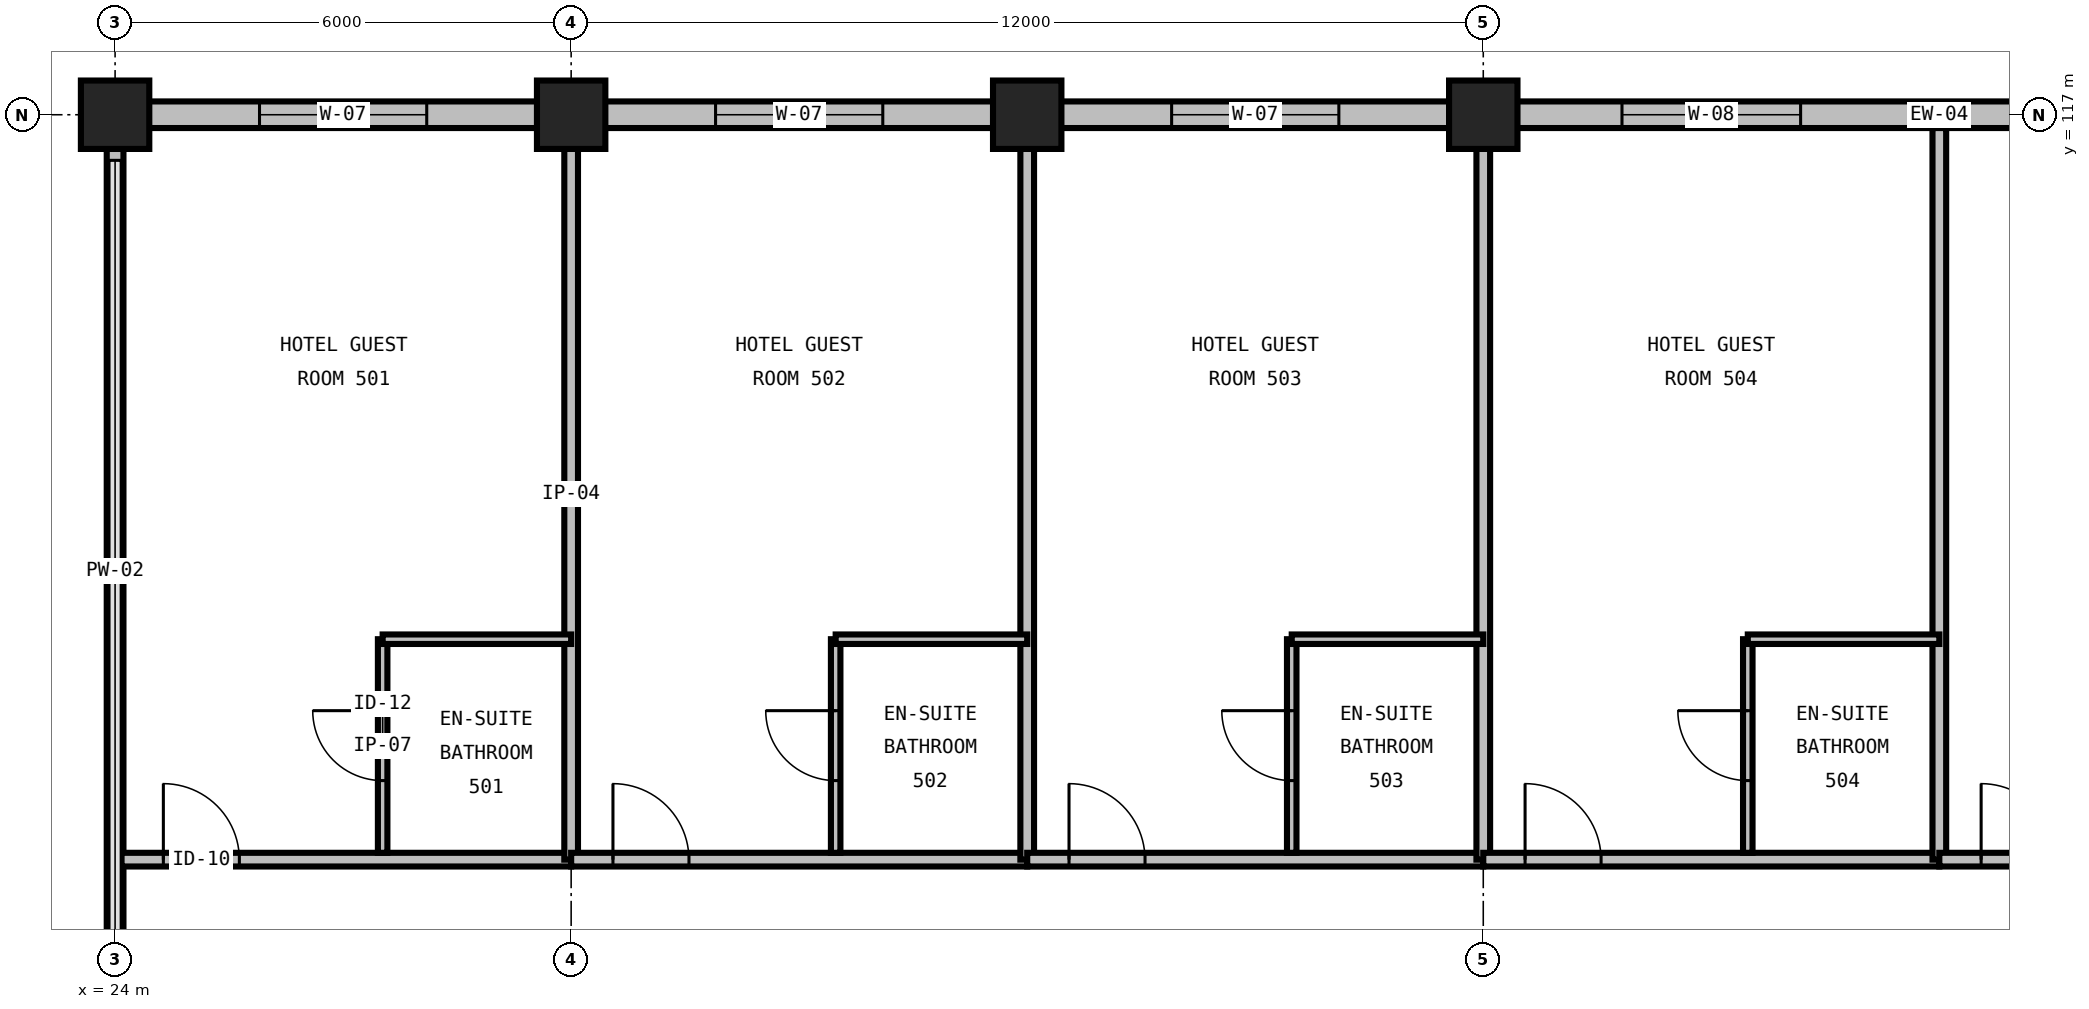
"""IFC4 building model, lengths in metres.
Left out: names, types, materials, properties, quantities, classifications, styles, units other than length and angle.
Written with IfcOpenShell. Run it as: python <this file> out.ifc"""

import sys

from ifc_helpers import new_model, si_unit, direction, frame, frame_2d, origin, origin_2d, place, context, subcontext, project, spatial, rectangle, extrude, element, fill, save


model = new_model("IFC4")
c1 = context("Model", 3, precision=1e-05, world=origin(), true_north=direction((0.0, 1.0)))
c2 = subcontext(c1, "Body", "Model", "MODEL_VIEW")
j1 = project(units=[si_unit("LENGTHUNIT", "METRE"), si_unit("PLANEANGLEUNIT", "RADIAN")], contexts=[c1])
p1 = place(None, origin())
s1 = spatial("IfcSite", under=j1, at=p1, CompositionType="ELEMENT")
p2 = place(p1, origin())
s2 = spatial("IfcBuilding", under=s1, at=p2, CompositionType="ELEMENT")
p3 = place(p2, frame((0.0, 0.0, 27.6)))
s3 = spatial("IfcBuildingStorey", under=s2, at=p3, CompositionType="ELEMENT", Elevation=27.6)
for number, where, z_axis, x_axis in (
    (1, (24.0, 117.0, 0.0), (0.0, 0.0, 1.0), (1.0, 0.0, 0.0)),
    (2, (30.0, 117.0, 0.0), (0.0, 0.0, 1.0), (1.0, 0.0, 0.0)),
    (3, (36.0, 117.0, 0.0), (0.0, 0.0, 1.0), (1.0, 0.0, 0.0)),
    (4, (42.0, 117.0, 0.0), (0.0, 0.0, 1.0), (1.0, 0.0, 0.0)),
):
    element("IfcColumn", number, at=place(p3, frame(where, z_axis=z_axis, x_axis=x_axis)), inside=s3, PredefinedType="COLUMN", context=c2, shape_type="SweptSolid", body=[
        extrude(rectangle(XDim=0.9, YDim=0.9, at=origin_2d()), origin(), (0.0, 0.0, 1.0), 3.6),
    ])
p4 = place(p3, frame((30.0, 117.0, 0.0), z_axis=(0.0, 0.0, 1.0), x_axis=(-1.0, 0.0, 0.0)))
e5 = element("IfcWall", 5, at=p4, inside=s3, PredefinedType="STANDARD", context=c2, shape_type="SweptSolid", body=[
    extrude(rectangle(XDim=6.0, YDim=0.35, at=frame_2d((3.0, 0.0))), origin(), (0.0, 0.0, 1.0), 2.486),
])
p5 = place(p4, frame((1.9, 0.0, 0.75)))
e6 = element("IfcOpeningElement", 6, at=p5, cuts=e5, PredefinedType="OPENING", context=c2, shape_type="SweptSolid", body=[
    extrude(rectangle(XDim=2.2, YDim=1.6, at=frame_2d((1.1, 0.8))), frame((0.0, 0.19, 0.0), z_axis=(0.0, -1.0, 0.0), x_axis=(1.0, 0.0, 0.0)), (0.0, 0.0, 1.0), 0.38),
])
p6 = place(p3, frame((36.0, 117.0, 0.0), z_axis=(0.0, 0.0, 1.0), x_axis=(-1.0, 0.0, 0.0)))
e7 = element("IfcWall", 7, at=p6, inside=s3, PredefinedType="STANDARD", context=c2, shape_type="SweptSolid", body=[
    extrude(rectangle(XDim=6.0, YDim=0.35, at=frame_2d((3.0, 0.0))), origin(), (0.0, 0.0, 1.0), 2.486),
])
p7 = place(p6, frame((1.9, 0.0, 0.75)))
e8 = element("IfcOpeningElement", 8, at=p7, cuts=e7, PredefinedType="OPENING", context=c2, shape_type="SweptSolid", body=[
    extrude(rectangle(XDim=2.2, YDim=1.6, at=frame_2d((1.1, 0.8))), frame((0.0, 0.19, 0.0), z_axis=(0.0, -1.0, 0.0), x_axis=(1.0, 0.0, 0.0)), (0.0, 0.0, 1.0), 0.38),
])
p8 = place(p3, frame((42.0, 117.0, 0.0), z_axis=(0.0, 0.0, 1.0), x_axis=(-1.0, 0.0, 0.0)))
e9 = element("IfcWall", 9, at=p8, inside=s3, PredefinedType="STANDARD", context=c2, shape_type="SweptSolid", body=[
    extrude(rectangle(XDim=6.0, YDim=0.35, at=frame_2d((3.0, 0.0))), origin(), (0.0, 0.0, 1.0), 2.486),
])
p9 = place(p8, frame((1.9, 0.0, 0.75)))
e10 = element("IfcOpeningElement", 10, at=p9, cuts=e9, PredefinedType="OPENING", context=c2, shape_type="SweptSolid", body=[
    extrude(rectangle(XDim=2.2, YDim=1.6, at=frame_2d((1.1, 0.8))), frame((0.0, 0.19, 0.0), z_axis=(0.0, -1.0, 0.0), x_axis=(1.0, 0.0, 0.0)), (0.0, 0.0, 1.0), 0.38),
])
p10 = place(p3, frame((54.0, 117.0, 0.0), z_axis=(0.0, 0.0, 1.0), x_axis=(-1.0, 0.0, 0.0)))
e11 = element("IfcWall", 11, at=p10, inside=s3, PredefinedType="STANDARD", context=c2, shape_type="SweptSolid", body=[
    extrude(rectangle(XDim=12.0, YDim=0.35, at=frame_2d((6.0, 0.0))), origin(), (0.0, 0.0, 1.0), 2.486),
])
p11 = place(p10, frame((1.9, 0.0, 0.75)))
e12 = element("IfcOpeningElement", 12, at=p11, cuts=e11, PredefinedType="OPENING", context=c2, shape_type="SweptSolid", body=[
    extrude(rectangle(XDim=2.2, YDim=1.6, at=frame_2d((1.1, 0.8))), frame((0.0, 0.19, 0.0), z_axis=(0.0, -1.0, 0.0), x_axis=(1.0, 0.0, 0.0)), (0.0, 0.0, 1.0), 0.38),
])
p12 = place(p10, frame((7.825, 0.0, 0.75)))
e13 = element("IfcOpeningElement", 13, at=p12, cuts=e11, PredefinedType="OPENING", context=c2, shape_type="SweptSolid", body=[
    extrude(rectangle(XDim=2.35, YDim=1.6, at=frame_2d((1.175, 0.8))), frame((0.0, 0.19, 0.0), z_axis=(0.0, -1.0, 0.0), x_axis=(1.0, 0.0, 0.0)), (0.0, 0.0, 1.0), 0.38),
])
p13 = place(p3, frame((24.0, 117.0, 0.0), z_axis=(0.0, 0.0, 1.0), x_axis=(0.0, -1.0, 0.0)))
e14 = element("IfcWall", 14, at=p13, inside=s3, PredefinedType="PARAPET", context=c2, shape_type="SweptSolid", body=[
    extrude(rectangle(XDim=12.0, YDim=0.22, at=frame_2d((6.0, 0.0))), origin(), (0.0, 0.0, 1.0), 0.2),
])
p14 = place(p3, frame((24.085, 107.2, 0.0), z_axis=(0.0, 0.0, 1.0), x_axis=(1.0, 0.0, 0.0)))
e15 = element("IfcWall", 15, at=p14, inside=s3, PredefinedType="PARTITIONING", context=c2, shape_type="SweptSolid", body=[
    extrude(rectangle(XDim=5.915, YDim=0.18, at=frame_2d((2.957, 0.0))), origin(), (0.0, 0.0, 1.0), 3.29),
])
p15 = place(p14, frame((0.55, 0.0, 0.0)))
e16 = element("IfcOpeningElement", 16, at=p15, cuts=e15, PredefinedType="OPENING", context=c2, shape_type="SweptSolid", body=[
    extrude(rectangle(XDim=1.0, YDim=2.15, at=frame_2d((0.5, 1.075))), frame((0.0, 0.105, 0.0), z_axis=(0.0, -1.0, 0.0), x_axis=(1.0, 0.0, 0.0)), (0.0, 0.0, 1.0), 0.21),
])
p16 = place(p3, frame((30.0, 107.2, 0.0), z_axis=(0.0, 0.0, 1.0), x_axis=(0.0, 1.0, 0.0)))
e17 = element("IfcWall", 17, at=p16, inside=s3, PredefinedType="PARTITIONING", context=c2, shape_type="SweptSolid", body=[
    extrude(rectangle(XDim=9.625, YDim=0.18, at=frame_2d((4.812, 0.0))), origin(), (0.0, 0.0, 1.0), 2.59),
])
p17 = place(p3, frame((27.52, 107.29, 0.0), z_axis=(0.0, 0.0, 1.0), x_axis=(0.0, 1.0, 0.0)))
e18 = element("IfcWall", 18, at=p17, inside=s3, PredefinedType="PARTITIONING", context=c2, shape_type="SweptSolid", body=[
    extrude(rectangle(XDim=2.81, YDim=0.125, at=frame_2d((1.405, 0.0))), origin(), (0.0, 0.0, 1.0), 3.29),
])
p18 = place(p17, frame((0.95, 0.0, 0.0)))
e19 = element("IfcOpeningElement", 19, at=p18, cuts=e18, PredefinedType="OPENING", context=c2, shape_type="SweptSolid", body=[
    extrude(rectangle(XDim=0.92, YDim=2.1, at=frame_2d((0.46, 1.05))), frame((0.0, 0.077, 0.0), z_axis=(0.0, -1.0, 0.0), x_axis=(1.0, 0.0, 0.0)), (0.0, 0.0, 1.0), 0.155),
])
p19 = place(p3, frame((27.52, 110.1, 0.0), z_axis=(0.0, 0.0, 1.0), x_axis=(1.0, 0.0, 0.0)))
e20 = element("IfcWall", 20, at=p19, inside=s3, PredefinedType="PARTITIONING", context=c2, shape_type="SweptSolid", body=[
    extrude(rectangle(XDim=2.48, YDim=0.125, at=frame_2d((1.24, 0.0))), origin(), (0.0, 0.0, 1.0), 3.29),
])
p20 = place(p3, frame((30.0, 107.2, 0.0), z_axis=(0.0, 0.0, 1.0), x_axis=(1.0, 0.0, 0.0)))
e21 = element("IfcWall", 21, at=p20, inside=s3, PredefinedType="PARTITIONING", context=c2, shape_type="SweptSolid", body=[
    extrude(rectangle(XDim=6.0, YDim=0.18, at=frame_2d((3.0, 0.0))), origin(), (0.0, 0.0, 1.0), 3.29),
])
p21 = place(p20, frame((0.55, 0.0, 0.0)))
e22 = element("IfcOpeningElement", 22, at=p21, cuts=e21, PredefinedType="OPENING", context=c2, shape_type="SweptSolid", body=[
    extrude(rectangle(XDim=1.0, YDim=2.15, at=frame_2d((0.5, 1.075))), frame((0.0, 0.105, 0.0), z_axis=(0.0, -1.0, 0.0), x_axis=(1.0, 0.0, 0.0)), (0.0, 0.0, 1.0), 0.21),
])
p22 = place(p3, frame((36.0, 107.2, 0.0), z_axis=(0.0, 0.0, 1.0), x_axis=(0.0, 1.0, 0.0)))
e23 = element("IfcWall", 23, at=p22, inside=s3, PredefinedType="PARTITIONING", context=c2, shape_type="SweptSolid", body=[
    extrude(rectangle(XDim=9.625, YDim=0.18, at=frame_2d((4.812, 0.0))), origin(), (0.0, 0.0, 1.0), 2.59),
])
p23 = place(p3, frame((33.48, 107.29, 0.0), z_axis=(0.0, 0.0, 1.0), x_axis=(0.0, 1.0, 0.0)))
e24 = element("IfcWall", 24, at=p23, inside=s3, PredefinedType="PARTITIONING", context=c2, shape_type="SweptSolid", body=[
    extrude(rectangle(XDim=2.81, YDim=0.125, at=frame_2d((1.405, 0.0))), origin(), (0.0, 0.0, 1.0), 3.29),
])
p24 = place(p23, frame((0.95, 0.0, 0.0)))
e25 = element("IfcOpeningElement", 25, at=p24, cuts=e24, PredefinedType="OPENING", context=c2, shape_type="SweptSolid", body=[
    extrude(rectangle(XDim=0.92, YDim=2.1, at=frame_2d((0.46, 1.05))), frame((0.0, 0.077, 0.0), z_axis=(0.0, -1.0, 0.0), x_axis=(1.0, 0.0, 0.0)), (0.0, 0.0, 1.0), 0.155),
])
p25 = place(p3, frame((33.48, 110.1, 0.0), z_axis=(0.0, 0.0, 1.0), x_axis=(1.0, 0.0, 0.0)))
e26 = element("IfcWall", 26, at=p25, inside=s3, PredefinedType="PARTITIONING", context=c2, shape_type="SweptSolid", body=[
    extrude(rectangle(XDim=2.52, YDim=0.125, at=frame_2d((1.26, 0.0))), origin(), (0.0, 0.0, 1.0), 3.29),
])
p26 = place(p3, frame((36.0, 107.2, 0.0), z_axis=(0.0, 0.0, 1.0), x_axis=(1.0, 0.0, 0.0)))
e27 = element("IfcWall", 27, at=p26, inside=s3, PredefinedType="PARTITIONING", context=c2, shape_type="SweptSolid", body=[
    extrude(rectangle(XDim=6.0, YDim=0.18, at=frame_2d((3.0, 0.0))), origin(), (0.0, 0.0, 1.0), 3.29),
])
p27 = place(p26, frame((0.55, 0.0, 0.0)))
e28 = element("IfcOpeningElement", 28, at=p27, cuts=e27, PredefinedType="OPENING", context=c2, shape_type="SweptSolid", body=[
    extrude(rectangle(XDim=1.0, YDim=2.15, at=frame_2d((0.5, 1.075))), frame((0.0, 0.105, 0.0), z_axis=(0.0, -1.0, 0.0), x_axis=(1.0, 0.0, 0.0)), (0.0, 0.0, 1.0), 0.21),
])
p28 = place(p3, frame((42.0, 107.2, 0.0), z_axis=(0.0, 0.0, 1.0), x_axis=(0.0, 1.0, 0.0)))
e29 = element("IfcWall", 29, at=p28, inside=s3, PredefinedType="PARTITIONING", context=c2, shape_type="SweptSolid", body=[
    extrude(rectangle(XDim=9.625, YDim=0.18, at=frame_2d((4.812, 0.0))), origin(), (0.0, 0.0, 1.0), 2.59),
])
p29 = place(p3, frame((39.48, 107.29, 0.0), z_axis=(0.0, 0.0, 1.0), x_axis=(0.0, 1.0, 0.0)))
e30 = element("IfcWall", 30, at=p29, inside=s3, PredefinedType="PARTITIONING", context=c2, shape_type="SweptSolid", body=[
    extrude(rectangle(XDim=2.81, YDim=0.125, at=frame_2d((1.405, 0.0))), origin(), (0.0, 0.0, 1.0), 3.29),
])
p30 = place(p29, frame((0.95, 0.0, 0.0)))
e31 = element("IfcOpeningElement", 31, at=p30, cuts=e30, PredefinedType="OPENING", context=c2, shape_type="SweptSolid", body=[
    extrude(rectangle(XDim=0.92, YDim=2.1, at=frame_2d((0.46, 1.05))), frame((0.0, 0.077, 0.0), z_axis=(0.0, -1.0, 0.0), x_axis=(1.0, 0.0, 0.0)), (0.0, 0.0, 1.0), 0.155),
])
p31 = place(p3, frame((39.48, 110.1, 0.0), z_axis=(0.0, 0.0, 1.0), x_axis=(1.0, 0.0, 0.0)))
e32 = element("IfcWall", 32, at=p31, inside=s3, PredefinedType="PARTITIONING", context=c2, shape_type="SweptSolid", body=[
    extrude(rectangle(XDim=2.52, YDim=0.125, at=frame_2d((1.26, 0.0))), origin(), (0.0, 0.0, 1.0), 3.29),
])
p32 = place(p3, frame((42.0, 107.2, 0.0), z_axis=(0.0, 0.0, 1.0), x_axis=(1.0, 0.0, 0.0)))
e33 = element("IfcWall", 33, at=p32, inside=s3, PredefinedType="PARTITIONING", context=c2, shape_type="SweptSolid", body=[
    extrude(rectangle(XDim=6.0, YDim=0.18, at=frame_2d((3.0, 0.0))), origin(), (0.0, 0.0, 1.0), 3.29),
])
p33 = place(p32, frame((0.55, 0.0, 0.0)))
e34 = element("IfcOpeningElement", 34, at=p33, cuts=e33, PredefinedType="OPENING", context=c2, shape_type="SweptSolid", body=[
    extrude(rectangle(XDim=1.0, YDim=2.15, at=frame_2d((0.5, 1.075))), frame((0.0, 0.105, 0.0), z_axis=(0.0, -1.0, 0.0), x_axis=(1.0, 0.0, 0.0)), (0.0, 0.0, 1.0), 0.21),
])
p34 = place(p3, frame((48.0, 107.2, 0.0), z_axis=(0.0, 0.0, 1.0), x_axis=(0.0, 1.0, 0.0)))
e35 = element("IfcWall", 35, at=p34, inside=s3, PredefinedType="PARTITIONING", context=c2, shape_type="SweptSolid", body=[
    extrude(rectangle(XDim=9.625, YDim=0.18, at=frame_2d((4.812, 0.0))), origin(), (0.0, 0.0, 1.0), 3.29),
])
p35 = place(p3, frame((45.48, 107.29, 0.0), z_axis=(0.0, 0.0, 1.0), x_axis=(0.0, 1.0, 0.0)))
e36 = element("IfcWall", 36, at=p35, inside=s3, PredefinedType="PARTITIONING", context=c2, shape_type="SweptSolid", body=[
    extrude(rectangle(XDim=2.81, YDim=0.125, at=frame_2d((1.405, 0.0))), origin(), (0.0, 0.0, 1.0), 3.29),
])
p36 = place(p35, frame((0.95, 0.0, 0.0)))
e37 = element("IfcOpeningElement", 37, at=p36, cuts=e36, PredefinedType="OPENING", context=c2, shape_type="SweptSolid", body=[
    extrude(rectangle(XDim=0.92, YDim=2.1, at=frame_2d((0.46, 1.05))), frame((0.0, 0.077, 0.0), z_axis=(0.0, -1.0, 0.0), x_axis=(1.0, 0.0, 0.0)), (0.0, 0.0, 1.0), 0.155),
])
p37 = place(p3, frame((45.48, 110.1, 0.0), z_axis=(0.0, 0.0, 1.0), x_axis=(1.0, 0.0, 0.0)))
e38 = element("IfcWall", 38, at=p37, inside=s3, PredefinedType="PARTITIONING", context=c2, shape_type="SweptSolid", body=[
    extrude(rectangle(XDim=2.52, YDim=0.125, at=frame_2d((1.26, 0.0))), origin(), (0.0, 0.0, 1.0), 3.29),
])
p38 = place(p3, frame((48.0, 107.2, 0.0), z_axis=(0.0, 0.0, 1.0), x_axis=(1.0, 0.0, 0.0)))
e39 = element("IfcWall", 39, at=p38, inside=s3, PredefinedType="PARTITIONING", context=c2, shape_type="SweptSolid", body=[
    extrude(rectangle(XDim=6.0, YDim=0.18, at=frame_2d((3.0, 0.0))), origin(), (0.0, 0.0, 1.0), 3.29),
])
p39 = place(p38, frame((0.55, 0.0, 0.0)))
e40 = element("IfcOpeningElement", 40, at=p39, cuts=e39, PredefinedType="OPENING", context=c2, shape_type="SweptSolid", body=[
    extrude(rectangle(XDim=1.0, YDim=2.15, at=frame_2d((0.5, 1.075))), frame((0.0, 0.105, 0.0), z_axis=(0.0, -1.0, 0.0), x_axis=(1.0, 0.0, 0.0)), (0.0, 0.0, 1.0), 0.21),
])
p40 = place(p5, origin())
e41 = element("IfcWindow", 41, at=p40, inside=s3, PartitioningType="DOUBLE_PANEL_VERTICAL", PredefinedType="WINDOW", context=c2, shape_type="SweptSolid", body=[
    extrude(rectangle(XDim=2.2, YDim=1.6, at=frame_2d((1.1, 0.8))), frame((0.0, 0.03, 0.0), z_axis=(0.0, -1.0, 0.0), x_axis=(1.0, 0.0, 0.0)), (0.0, 0.0, 1.0), 0.06),
])
fill(e6, e41)
p41 = place(p7, origin())
e42 = element("IfcWindow", 42, at=p41, inside=s3, PartitioningType="DOUBLE_PANEL_VERTICAL", PredefinedType="WINDOW", context=c2, shape_type="SweptSolid", body=[
    extrude(rectangle(XDim=2.2, YDim=1.6, at=frame_2d((1.1, 0.8))), frame((0.0, 0.03, 0.0), z_axis=(0.0, -1.0, 0.0), x_axis=(1.0, 0.0, 0.0)), (0.0, 0.0, 1.0), 0.06),
])
fill(e8, e42)
p42 = place(p9, origin())
e43 = element("IfcWindow", 43, at=p42, inside=s3, PartitioningType="DOUBLE_PANEL_VERTICAL", PredefinedType="WINDOW", context=c2, shape_type="SweptSolid", body=[
    extrude(rectangle(XDim=2.2, YDim=1.6, at=frame_2d((1.1, 0.8))), frame((0.0, 0.03, 0.0), z_axis=(0.0, -1.0, 0.0), x_axis=(1.0, 0.0, 0.0)), (0.0, 0.0, 1.0), 0.06),
])
fill(e10, e43)
p43 = place(p12, origin())
e44 = element("IfcWindow", 44, at=p43, inside=s3, PartitioningType="DOUBLE_PANEL_VERTICAL", PredefinedType="WINDOW", context=c2, shape_type="SweptSolid", body=[
    extrude(rectangle(XDim=2.35, YDim=1.6, at=frame_2d((1.175, 0.8))), frame((0.0, 0.03, 0.0), z_axis=(0.0, -1.0, 0.0), x_axis=(1.0, 0.0, 0.0)), (0.0, 0.0, 1.0), 0.06),
])
fill(e13, e44)
p44 = place(p15, origin())
e45 = element("IfcDoor", 45, at=p44, inside=s3, OperationType="SINGLE_SWING_LEFT", PredefinedType="DOOR", context=c2, shape_type="SweptSolid", body=[
    extrude(rectangle(XDim=1.0, YDim=2.15, at=frame_2d((0.5, 1.075))), frame((0.0, 0.025, 0.0), z_axis=(0.0, -1.0, 0.0), x_axis=(1.0, 0.0, 0.0)), (0.0, 0.0, 1.0), 0.05),
])
fill(e16, e45)
p45 = place(p18, origin())
e46 = element("IfcDoor", 46, at=p45, inside=s3, OperationType="SINGLE_SWING_RIGHT", PredefinedType="DOOR", context=c2, shape_type="SweptSolid", body=[
    extrude(rectangle(XDim=0.92, YDim=2.1, at=frame_2d((0.46, 1.05))), frame((0.0, 0.025, 0.0), z_axis=(0.0, -1.0, 0.0), x_axis=(1.0, 0.0, 0.0)), (0.0, 0.0, 1.0), 0.05),
])
fill(e19, e46)
p46 = place(p21, origin())
e47 = element("IfcDoor", 47, at=p46, inside=s3, OperationType="SINGLE_SWING_LEFT", PredefinedType="DOOR", context=c2, shape_type="SweptSolid", body=[
    extrude(rectangle(XDim=1.0, YDim=2.15, at=frame_2d((0.5, 1.075))), frame((0.0, 0.025, 0.0), z_axis=(0.0, -1.0, 0.0), x_axis=(1.0, 0.0, 0.0)), (0.0, 0.0, 1.0), 0.05),
])
fill(e22, e47)
p47 = place(p24, origin())
e48 = element("IfcDoor", 48, at=p47, inside=s3, OperationType="SINGLE_SWING_RIGHT", PredefinedType="DOOR", context=c2, shape_type="SweptSolid", body=[
    extrude(rectangle(XDim=0.92, YDim=2.1, at=frame_2d((0.46, 1.05))), frame((0.0, 0.025, 0.0), z_axis=(0.0, -1.0, 0.0), x_axis=(1.0, 0.0, 0.0)), (0.0, 0.0, 1.0), 0.05),
])
fill(e25, e48)
p48 = place(p27, origin())
e49 = element("IfcDoor", 49, at=p48, inside=s3, OperationType="SINGLE_SWING_LEFT", PredefinedType="DOOR", context=c2, shape_type="SweptSolid", body=[
    extrude(rectangle(XDim=1.0, YDim=2.15, at=frame_2d((0.5, 1.075))), frame((0.0, 0.025, 0.0), z_axis=(0.0, -1.0, 0.0), x_axis=(1.0, 0.0, 0.0)), (0.0, 0.0, 1.0), 0.05),
])
fill(e28, e49)
p49 = place(p30, origin())
e50 = element("IfcDoor", 50, at=p49, inside=s3, OperationType="SINGLE_SWING_RIGHT", PredefinedType="DOOR", context=c2, shape_type="SweptSolid", body=[
    extrude(rectangle(XDim=0.92, YDim=2.1, at=frame_2d((0.46, 1.05))), frame((0.0, 0.025, 0.0), z_axis=(0.0, -1.0, 0.0), x_axis=(1.0, 0.0, 0.0)), (0.0, 0.0, 1.0), 0.05),
])
fill(e31, e50)
p50 = place(p33, origin())
e51 = element("IfcDoor", 51, at=p50, inside=s3, OperationType="SINGLE_SWING_LEFT", PredefinedType="DOOR", context=c2, shape_type="SweptSolid", body=[
    extrude(rectangle(XDim=1.0, YDim=2.15, at=frame_2d((0.5, 1.075))), frame((0.0, 0.025, 0.0), z_axis=(0.0, -1.0, 0.0), x_axis=(1.0, 0.0, 0.0)), (0.0, 0.0, 1.0), 0.05),
])
fill(e34, e51)
p51 = place(p36, origin())
e52 = element("IfcDoor", 52, at=p51, inside=s3, OperationType="SINGLE_SWING_RIGHT", PredefinedType="DOOR", context=c2, shape_type="SweptSolid", body=[
    extrude(rectangle(XDim=0.92, YDim=2.1, at=frame_2d((0.46, 1.05))), frame((0.0, 0.025, 0.0), z_axis=(0.0, -1.0, 0.0), x_axis=(1.0, 0.0, 0.0)), (0.0, 0.0, 1.0), 0.05),
])
fill(e37, e52)
p52 = place(p39, origin())
e53 = element("IfcDoor", 53, at=p52, inside=s3, OperationType="SINGLE_SWING_LEFT", PredefinedType="DOOR", context=c2, shape_type="SweptSolid", body=[
    extrude(rectangle(XDim=1.0, YDim=2.15, at=frame_2d((0.5, 1.075))), frame((0.0, 0.025, 0.0), z_axis=(0.0, -1.0, 0.0), x_axis=(1.0, 0.0, 0.0)), (0.0, 0.0, 1.0), 0.05),
])
fill(e40, e53)
save(model, sys.argv[1])
